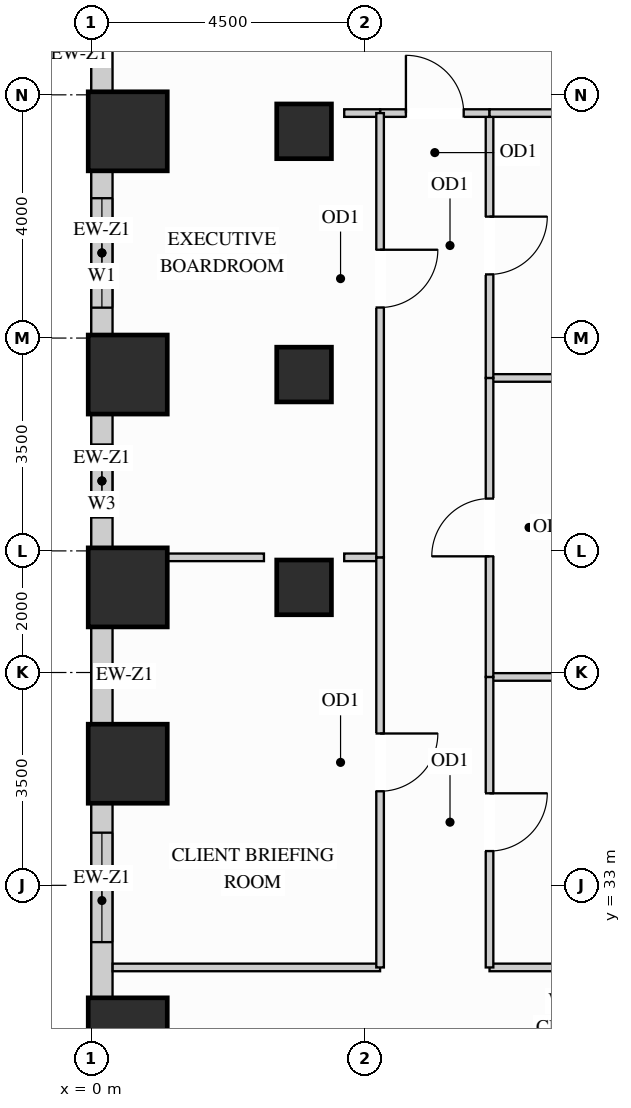
"""IFC4 building model, lengths in metres.
Left out: names, types, materials, properties, quantities, classifications, styles, units other than length and angle.
Written with IfcOpenShell. Run it as: python <this file> out.ifc"""

import sys

from ifc_helpers import new_model, si_unit, direction, frame, frame_2d, origin, origin_2d, place, context, subcontext, project, spatial, rectangle, extrude, source, transform, mapped, element, fill, save


model = new_model("IFC4")
c1 = context("Model", 3, precision=1e-05, world=origin(), true_north=direction((0.0, 1.0)))
c2 = subcontext(c1, "Body", "Model", "MODEL_VIEW")
j1 = project(units=[si_unit("LENGTHUNIT", "METRE"), si_unit("PLANEANGLEUNIT", "RADIAN")], contexts=[c1])
p1 = place(None, origin())
s1 = spatial("IfcSite", under=j1, at=p1, CompositionType="ELEMENT")
p2 = place(p1, origin())
s2 = spatial("IfcBuilding", under=s1, at=p2, CompositionType="ELEMENT")
p3 = place(p2, frame((0.0, 0.0, 65.7)))
s3 = spatial("IfcBuildingStorey", under=s2, at=p3, CompositionType="ELEMENT", Elevation=65.7)
m1 = source(origin(), c2, "Body", "SweptSolid", [
    extrude(rectangle(XDim=0.9, YDim=0.9, at=origin_2d()), origin(), (0.0, 0.0, 1.0), 3.38),
])
for number, where, z_axis, x_axis in (
    (1, (3.5, 37.9, 0.0), (0.0, 0.0, 1.0), (1.0, 0.0, 0.0)),
    (2, (3.5, 41.4, 0.0), (0.0, 0.0, 1.0), (1.0, 0.0, 0.0)),
    (3, (3.5, 45.4, 0.0), (0.0, 0.0, 1.0), (1.0, 0.0, 0.0)),
):
    element("IfcColumn", number, at=place(p3, frame(where, z_axis=z_axis, x_axis=x_axis)), inside=s3, PredefinedType="COLUMN", context=c2, shape_type="MappedRepresentation", body=[
        mapped(m1, transform((0.0, 0.0, 0.0), x_axis=(1.0, 0.0, 0.0), y_axis=(0.0, 1.0, 0.0), z_axis=(0.0, 0.0, 1.0))),
    ])
m2 = source(origin(), c2, "Body", "SweptSolid", [
    extrude(rectangle(XDim=1.3, YDim=1.3, at=origin_2d()), origin(), (0.0, 0.0, 1.0), 3.38),
])
for number, where, z_axis, x_axis in (
    (4, (0.6, 30.5, 0.0), (0.0, 0.0, 1.0), (1.0, 0.0, 0.0)),
    (5, (0.6, 35.0, 0.0), (0.0, 0.0, 1.0), (1.0, 0.0, 0.0)),
    (6, (0.6, 37.9, 0.0), (0.0, 0.0, 1.0), (1.0, 0.0, 0.0)),
    (7, (0.6, 41.4, 0.0), (0.0, 0.0, 1.0), (1.0, 0.0, 0.0)),
    (8, (0.6, 45.4, 0.0), (0.0, 0.0, 1.0), (1.0, 0.0, 0.0)),
):
    element("IfcColumn", number, at=place(p3, frame(where, z_axis=z_axis, x_axis=x_axis)), inside=s3, PredefinedType="COLUMN", context=c2, shape_type="MappedRepresentation", body=[
        mapped(m2, transform((0.0, 0.0, 0.0), x_axis=(1.0, 0.0, 0.0), y_axis=(0.0, 1.0, 0.0), z_axis=(0.0, 0.0, 1.0))),
    ])
m3 = source(origin(), c2, "Body", "SweptSolid", [
    extrude(rectangle(XDim=1.104, YDim=0.35, at=frame_2d((0.552, 0.0))), origin(), (0.0, 0.0, 1.0), 3.365),
])
p4 = place(p3, frame((0.175, 47.152, 0.0), z_axis=(0.0, 0.0, 1.0), x_axis=(0.0, -1.0, 0.0)))
e9 = element("IfcWall", 9, at=p4, inside=s3, PredefinedType="SOLIDWALL", context=c2, shape_type="MappedRepresentation", body=[
    mapped(m3, transform((0.0, 0.0, 0.0), x_axis=(1.0, 0.0, 0.0), y_axis=(0.0, 1.0, 0.0), z_axis=(0.0, 0.0, 1.0))),
])
p5 = place(p3, frame((0.175, 44.752, 0.0), z_axis=(0.0, 0.0, 1.0), x_axis=(0.0, -1.0, 0.0)))
e10 = element("IfcWall", 10, at=p5, inside=s3, PredefinedType="SOLIDWALL", context=c2, shape_type="SweptSolid", body=[
    extrude(rectangle(XDim=2.704, YDim=0.35, at=frame_2d((1.352, 0.0))), origin(), (0.0, 0.0, 1.0), 2.51),
])
p6 = place(p5, frame((0.452, 0.0, 0.78)))
e11 = element("IfcOpeningElement", 11, at=p6, cuts=e10, PredefinedType="OPENING", context=c2, shape_type="SweptSolid", body=[
    extrude(rectangle(XDim=1.8, YDim=1.55, at=frame_2d((0.9, 0.775))), frame((0.0, 0.185, 0.0), z_axis=(0.0, -1.0, 0.0), x_axis=(1.0, 0.0, 0.0)), (0.0, 0.0, 1.0), 0.37),
])
p7 = place(p3, frame((0.175, 40.752, 0.0), z_axis=(0.0, 0.0, 1.0), x_axis=(0.0, -1.0, 0.0)))
e12 = element("IfcWall", 12, at=p7, inside=s3, PredefinedType="SOLIDWALL", context=c2, shape_type="SweptSolid", body=[
    extrude(rectangle(XDim=2.204, YDim=0.35, at=frame_2d((1.102, 0.0))), origin(), (0.0, 0.0, 1.0), 2.51),
])
p8 = place(p7, frame((0.502, 0.0, 0.78)))
e13 = element("IfcOpeningElement", 13, at=p8, cuts=e12, PredefinedType="OPENING", context=c2, shape_type="SweptSolid", body=[
    extrude(rectangle(XDim=1.2, YDim=1.55, at=frame_2d((0.6, 0.775))), frame((0.0, 0.185, 0.0), z_axis=(0.0, -1.0, 0.0), x_axis=(1.0, 0.0, 0.0)), (0.0, 0.0, 1.0), 0.37),
])
m4 = source(origin(), c2, "Body", "SweptSolid", [
    extrude(rectangle(XDim=1.604, YDim=0.35, at=frame_2d((0.802, 0.0))), origin(), (0.0, 0.0, 1.0), 2.51),
])
p9 = place(p3, frame((0.175, 37.252, 0.0), z_axis=(0.0, 0.0, 1.0), x_axis=(0.0, -1.0, 0.0)))
e14 = element("IfcWall", 14, at=p9, inside=s3, PredefinedType="SOLIDWALL", context=c2, shape_type="MappedRepresentation", body=[
    mapped(m4, transform((0.0, 0.0, 0.0), x_axis=(1.0, 0.0, 0.0), y_axis=(0.0, 1.0, 0.0), z_axis=(0.0, 0.0, 1.0))),
])
p10 = place(p3, frame((0.175, 34.352, 0.0), z_axis=(0.0, 0.0, 1.0), x_axis=(0.0, -1.0, 0.0)))
e15 = element("IfcWall", 15, at=p10, inside=s3, PredefinedType="SOLIDWALL", context=c2, shape_type="SweptSolid", body=[
    extrude(rectangle(XDim=3.204, YDim=0.35, at=frame_2d((1.602, 0.0))), origin(), (0.0, 0.0, 1.0), 2.51),
])
p11 = place(p10, frame((0.486, 0.0, 0.78)))
e16 = element("IfcOpeningElement", 16, at=p11, cuts=e15, PredefinedType="OPENING", context=c2, shape_type="SweptSolid", body=[
    extrude(rectangle(XDim=1.8, YDim=1.55, at=frame_2d((0.9, 0.775))), frame((0.0, 0.185, 0.0), z_axis=(0.0, -1.0, 0.0), x_axis=(1.0, 0.0, 0.0)), (0.0, 0.0, 1.0), 0.37),
])
m5 = source(origin(), c2, "Body", "SweptSolid", [
    extrude(rectangle(XDim=12.598, YDim=0.125, at=frame_2d((6.299, 0.0))), origin(), (0.0, 0.0, 1.0), 2.828),
])
p12 = place(p3, frame((6.55, 36.427, 0.0), z_axis=(0.0, 0.0, 1.0), x_axis=(1.0, 0.0, 0.0)))
e17 = element("IfcWall", 17, at=p12, inside=s3, PredefinedType="PARTITIONING", context=c2, shape_type="MappedRepresentation", body=[
    mapped(m5, transform((0.0, 0.0, 0.0), x_axis=(1.0, 0.0, 0.0), y_axis=(0.0, 1.0, 0.0), z_axis=(0.0, 0.0, 1.0))),
])
m6 = source(origin(), c2, "Body", "SweptSolid", [
    extrude(rectangle(XDim=1.79, YDim=0.125, at=frame_2d((0.895, 0.0))), origin(), (0.0, 0.0, 1.0), 2.67),
])
p13 = place(p3, frame((6.55, 41.344, 0.0), z_axis=(0.0, 0.0, 1.0), x_axis=(1.0, 0.0, 0.0)))
e18 = element("IfcWall", 18, at=p13, inside=s3, PredefinedType="PARTITIONING", context=c2, shape_type="MappedRepresentation", body=[
    mapped(m6, transform((0.0, 0.0, 0.0), x_axis=(1.0, 0.0, 0.0), y_axis=(0.0, 1.0, 0.0), z_axis=(0.0, 0.0, 1.0))),
])
p14 = place(p3, frame((6.55, 31.65, 0.0), z_axis=(0.0, 0.0, 1.0), x_axis=(1.0, 0.0, 0.0)))
e19 = element("IfcWall", 19, at=p14, inside=s3, PredefinedType="PARTITIONING", context=c2, shape_type="MappedRepresentation", body=[
    mapped(m5, transform((0.0, 0.0, 0.0), x_axis=(1.0, 0.0, 0.0), y_axis=(0.0, 1.0, 0.0), z_axis=(0.0, 0.0, 1.0))),
])
m7 = source(origin(), c2, "Body", "SweptSolid", [
    extrude(rectangle(XDim=4.398, YDim=0.125, at=frame_2d((2.199, 0.0))), origin(), (0.0, 0.0, 1.0), 2.828),
])
p15 = place(p3, frame((0.352, 31.65, 0.0), z_axis=(0.0, 0.0, 1.0), x_axis=(1.0, 0.0, 0.0)))
e20 = element("IfcWall", 20, at=p15, inside=s3, PredefinedType="PARTITIONING", context=c2, shape_type="MappedRepresentation", body=[
    mapped(m7, transform((0.0, 0.0, 0.0), x_axis=(1.0, 0.0, 0.0), y_axis=(0.0, 1.0, 0.0), z_axis=(0.0, 0.0, 1.0))),
])
m8 = source(origin(), c2, "Body", "SweptSolid", [
    extrude(rectangle(XDim=1.58, YDim=0.125, at=frame_2d((0.79, 0.0))), origin(), (0.0, 0.0, 1.0), 3.365),
])
p16 = place(p3, frame((1.26, 38.394, 0.0), z_axis=(0.0, 0.0, 1.0), x_axis=(1.0, 0.0, 0.0)))
e21 = element("IfcWall", 21, at=p16, inside=s3, PredefinedType="PARTITIONING", context=c2, shape_type="MappedRepresentation", body=[
    mapped(m8, transform((0.0, 0.0, 0.0), x_axis=(1.0, 0.0, 0.0), y_axis=(0.0, 1.0, 0.0), z_axis=(0.0, 0.0, 1.0))),
])
m9 = source(origin(), c2, "Body", "SweptSolid", [
    extrude(rectangle(XDim=0.59, YDim=0.125, at=frame_2d((0.295, 0.0))), origin(), (0.0, 0.0, 1.0), 3.365),
])
p17 = place(p3, frame((4.16, 38.394, 0.0), z_axis=(0.0, 0.0, 1.0), x_axis=(1.0, 0.0, 0.0)))
e22 = element("IfcWall", 22, at=p17, inside=s3, PredefinedType="PARTITIONING", context=c2, shape_type="MappedRepresentation", body=[
    mapped(m9, transform((0.0, 0.0, 0.0), x_axis=(1.0, 0.0, 0.0), y_axis=(0.0, 1.0, 0.0), z_axis=(0.0, 0.0, 1.0))),
])
p18 = place(p3, frame((6.55, 31.65, 0.0), z_axis=(0.0, 0.0, 1.0), x_axis=(0.0, 1.0, 0.0)))
e23 = element("IfcWall", 23, at=p18, inside=s3, PredefinedType="PARTITIONING", context=c2, shape_type="SweptSolid", body=[
    extrude(rectangle(XDim=4.777, YDim=0.125, at=frame_2d((2.389, 0.0))), origin(), (0.0, 0.0, 1.0), 3.365),
])
p19 = place(p18, frame((1.914, 0.0, 0.0)))
e24 = element("IfcOpeningElement", 24, at=p19, cuts=e23, PredefinedType="OPENING", context=c2, shape_type="SweptSolid", body=[
    extrude(rectangle(XDim=0.95, YDim=2.15, at=frame_2d((0.475, 1.075))), frame((0.0, 0.073, 0.0), z_axis=(0.0, -1.0, 0.0), x_axis=(1.0, 0.0, 0.0)), (0.0, 0.0, 1.0), 0.145),
])
p20 = place(p3, frame((6.55, 36.427, 0.0), z_axis=(0.0, 0.0, 1.0), x_axis=(0.0, 1.0, 0.0)))
e25 = element("IfcWall", 25, at=p20, inside=s3, PredefinedType="PARTITIONING", context=c2, shape_type="SweptSolid", body=[
    extrude(rectangle(XDim=4.917, YDim=0.125, at=frame_2d((2.458, 0.0))), origin(), (0.0, 0.0, 1.0), 3.365),
])
p21 = place(p20, frame((1.983, 0.0, 0.0)))
e26 = element("IfcOpeningElement", 26, at=p21, cuts=e25, PredefinedType="OPENING", context=c2, shape_type="SweptSolid", body=[
    extrude(rectangle(XDim=0.95, YDim=2.15, at=frame_2d((0.475, 1.075))), frame((0.0, 0.073, 0.0), z_axis=(0.0, -1.0, 0.0), x_axis=(1.0, 0.0, 0.0)), (0.0, 0.0, 1.0), 0.145),
])
p22 = place(p3, frame((6.55, 41.344, 0.0), z_axis=(0.0, 0.0, 1.0), x_axis=(0.0, 1.0, 0.0)))
e27 = element("IfcWall", 27, at=p22, inside=s3, PredefinedType="PARTITIONING", context=c2, shape_type="SweptSolid", body=[
    extrude(rectangle(XDim=4.356, YDim=0.125, at=frame_2d((2.178, 0.0))), origin(), (0.0, 0.0, 1.0), 3.365),
])
p23 = place(p22, frame((1.703, 0.0, 0.0)))
e28 = element("IfcOpeningElement", 28, at=p23, cuts=e27, PredefinedType="OPENING", context=c2, shape_type="SweptSolid", body=[
    extrude(rectangle(XDim=0.95, YDim=2.15, at=frame_2d((0.475, 1.075))), frame((0.0, 0.073, 0.0), z_axis=(0.0, -1.0, 0.0), x_axis=(1.0, 0.0, 0.0)), (0.0, 0.0, 1.0), 0.145),
])
p24 = place(p3, frame((4.75, 45.7, 0.0), z_axis=(0.0, 0.0, 1.0), x_axis=(1.0, 0.0, 0.0)))
e29 = element("IfcWall", 29, at=p24, inside=s3, PredefinedType="PARTITIONING", context=c2, shape_type="SweptSolid", body=[
    extrude(rectangle(XDim=1.8, YDim=0.125, at=frame_2d((0.9, 0.0))), origin(), (0.0, 0.0, 1.0), 2.67),
])
p25 = place(p24, frame((0.425, 0.0, 0.0)))
e30 = element("IfcOpeningElement", 30, at=p25, cuts=e29, PredefinedType="OPENING", context=c2, shape_type="SweptSolid", body=[
    extrude(rectangle(XDim=0.95, YDim=2.15, at=frame_2d((0.475, 1.075))), frame((0.0, 0.073, 0.0), z_axis=(0.0, -1.0, 0.0), x_axis=(1.0, 0.0, 0.0)), (0.0, 0.0, 1.0), 0.145),
])
p26 = place(p3, frame((6.55, 45.7, 0.0), z_axis=(0.0, 0.0, 1.0), x_axis=(1.0, 0.0, 0.0)))
e31 = element("IfcWall", 31, at=p26, inside=s3, PredefinedType="PARTITIONING", context=c2, shape_type="MappedRepresentation", body=[
    mapped(m6, transform((0.0, 0.0, 0.0), x_axis=(1.0, 0.0, 0.0), y_axis=(0.0, 1.0, 0.0), z_axis=(0.0, 0.0, 1.0))),
])
m10 = source(origin(), c2, "Body", "SweptSolid", [
    extrude(rectangle(XDim=0.59, YDim=0.125, at=frame_2d((0.295, 0.0))), origin(), (0.0, 0.0, 1.0), 2.67),
])
p27 = place(p3, frame((4.16, 45.7, 0.0), z_axis=(0.0, 0.0, 1.0), x_axis=(1.0, 0.0, 0.0)))
e32 = element("IfcWall", 32, at=p27, inside=s3, PredefinedType="PARTITIONING", context=c2, shape_type="MappedRepresentation", body=[
    mapped(m10, transform((0.0, 0.0, 0.0), x_axis=(1.0, 0.0, 0.0), y_axis=(0.0, 1.0, 0.0), z_axis=(0.0, 0.0, 1.0))),
])
p28 = place(p3, frame((4.75, 31.65, 0.0), z_axis=(0.0, 0.0, 1.0), x_axis=(0.0, 1.0, 0.0)))
e33 = element("IfcWall", 33, at=p28, inside=s3, PredefinedType="PARTITIONING", context=c2, shape_type="SweptSolid", body=[
    extrude(rectangle(XDim=6.744, YDim=0.125, at=frame_2d((3.372, 0.0))), origin(), (0.0, 0.0, 1.0), 3.365),
])
p29 = place(p28, frame((2.897, 0.0, 0.0)))
e34 = element("IfcOpeningElement", 34, at=p29, cuts=e33, PredefinedType="OPENING", context=c2, shape_type="SweptSolid", body=[
    extrude(rectangle(XDim=0.95, YDim=2.15, at=frame_2d((0.475, 1.075))), frame((0.0, 0.073, 0.0), z_axis=(0.0, -1.0, 0.0), x_axis=(1.0, 0.0, 0.0)), (0.0, 0.0, 1.0), 0.145),
])
p30 = place(p3, frame((4.75, 38.394, 0.0), z_axis=(0.0, 0.0, 1.0), x_axis=(0.0, 1.0, 0.0)))
e35 = element("IfcWall", 35, at=p30, inside=s3, PredefinedType="PARTITIONING", context=c2, shape_type="SweptSolid", body=[
    extrude(rectangle(XDim=7.306, YDim=0.125, at=frame_2d((3.653, 0.0))), origin(), (0.0, 0.0, 1.0), 3.365),
])
p31 = place(p30, frame((4.108, 0.0, 0.0)))
e36 = element("IfcOpeningElement", 36, at=p31, cuts=e35, PredefinedType="OPENING", context=c2, shape_type="SweptSolid", body=[
    extrude(rectangle(XDim=0.95, YDim=2.15, at=frame_2d((0.475, 1.075))), frame((0.0, 0.073, 0.0), z_axis=(0.0, -1.0, 0.0), x_axis=(1.0, 0.0, 0.0)), (0.0, 0.0, 1.0), 0.145),
])
m11 = source(origin(), c2, "Body", "SweptSolid", [
    extrude(rectangle(XDim=0.95, YDim=2.15, at=frame_2d((0.475, 1.075))), frame((0.0, 0.025, 0.0), z_axis=(0.0, -1.0, 0.0), x_axis=(1.0, 0.0, 0.0)), (0.0, 0.0, 1.0), 0.05),
])
p32 = place(p19, origin())
e37 = element("IfcDoor", 37, at=p32, inside=s3, OperationType="SINGLE_SWING_RIGHT", PredefinedType="DOOR", context=c2, shape_type="MappedRepresentation", body=[
    mapped(m11, transform((0.0, 0.0, 0.0), x_axis=(1.0, 0.0, 0.0), y_axis=(0.0, 1.0, 0.0), z_axis=(0.0, 0.0, 1.0))),
])
fill(e24, e37)
p33 = place(p21, origin())
e38 = element("IfcDoor", 38, at=p33, inside=s3, OperationType="SINGLE_SWING_LEFT", PredefinedType="DOOR", context=c2, shape_type="MappedRepresentation", body=[
    mapped(m11, transform((0.0, 0.0, 0.0), x_axis=(1.0, 0.0, 0.0), y_axis=(0.0, 1.0, 0.0), z_axis=(0.0, 0.0, 1.0))),
])
fill(e26, e38)
p34 = place(p23, origin())
e39 = element("IfcDoor", 39, at=p34, inside=s3, OperationType="SINGLE_SWING_RIGHT", PredefinedType="DOOR", context=c2, shape_type="MappedRepresentation", body=[
    mapped(m11, transform((0.0, 0.0, 0.0), x_axis=(1.0, 0.0, 0.0), y_axis=(0.0, 1.0, 0.0), z_axis=(0.0, 0.0, 1.0))),
])
fill(e28, e39)
p35 = place(p25, origin())
e40 = element("IfcDoor", 40, at=p35, inside=s3, OperationType="SINGLE_SWING_LEFT", PredefinedType="DOOR", context=c2, shape_type="MappedRepresentation", body=[
    mapped(m11, transform((0.0, 0.0, 0.0), x_axis=(1.0, 0.0, 0.0), y_axis=(0.0, 1.0, 0.0), z_axis=(0.0, 0.0, 1.0))),
])
fill(e30, e40)
p36 = place(p29, origin())
e41 = element("IfcDoor", 41, at=p36, inside=s3, OperationType="SINGLE_SWING_RIGHT", PredefinedType="DOOR", context=c2, shape_type="MappedRepresentation", body=[
    mapped(m11, transform((0.0, 0.0, 0.0), x_axis=(1.0, 0.0, 0.0), y_axis=(0.0, 1.0, 0.0), z_axis=(0.0, 0.0, 1.0))),
])
fill(e34, e41)
p37 = place(p31, origin())
e42 = element("IfcDoor", 42, at=p37, inside=s3, OperationType="SINGLE_SWING_RIGHT", PredefinedType="DOOR", context=c2, shape_type="MappedRepresentation", body=[
    mapped(m11, transform((0.0, 0.0, 0.0), x_axis=(1.0, 0.0, 0.0), y_axis=(0.0, 1.0, 0.0), z_axis=(0.0, 0.0, 1.0))),
])
fill(e36, e42)
m12 = source(origin(), c2, "Body", "SweptSolid", [
    extrude(rectangle(XDim=1.8, YDim=1.55, at=frame_2d((0.9, 0.775))), frame((0.0, 0.03, 0.0), z_axis=(0.0, -1.0, 0.0), x_axis=(1.0, 0.0, 0.0)), (0.0, 0.0, 1.0), 0.06),
])
p38 = place(p6, origin())
e43 = element("IfcWindow", 43, at=p38, inside=s3, PartitioningType="SINGLE_PANEL", PredefinedType="WINDOW", context=c2, shape_type="MappedRepresentation", body=[
    mapped(m12, transform((0.0, 0.0, 0.0), x_axis=(1.0, 0.0, 0.0), y_axis=(0.0, 1.0, 0.0), z_axis=(0.0, 0.0, 1.0))),
])
fill(e11, e43)
p39 = place(p11, origin())
e44 = element("IfcWindow", 44, at=p39, inside=s3, PartitioningType="SINGLE_PANEL", PredefinedType="WINDOW", context=c2, shape_type="MappedRepresentation", body=[
    mapped(m12, transform((0.0, 0.0, 0.0), x_axis=(1.0, 0.0, 0.0), y_axis=(0.0, 1.0, 0.0), z_axis=(0.0, 0.0, 1.0))),
])
fill(e16, e44)
m13 = source(origin(), c2, "Body", "SweptSolid", [
    extrude(rectangle(XDim=1.2, YDim=1.55, at=frame_2d((0.6, 0.775))), frame((0.0, 0.03, 0.0), z_axis=(0.0, -1.0, 0.0), x_axis=(1.0, 0.0, 0.0)), (0.0, 0.0, 1.0), 0.06),
])
p40 = place(p8, origin())
e45 = element("IfcWindow", 45, at=p40, inside=s3, PartitioningType="SINGLE_PANEL", PredefinedType="WINDOW", context=c2, shape_type="MappedRepresentation", body=[
    mapped(m13, transform((0.0, 0.0, 0.0), x_axis=(1.0, 0.0, 0.0), y_axis=(0.0, 1.0, 0.0), z_axis=(0.0, 0.0, 1.0))),
])
fill(e13, e45)
save(model, sys.argv[1])
